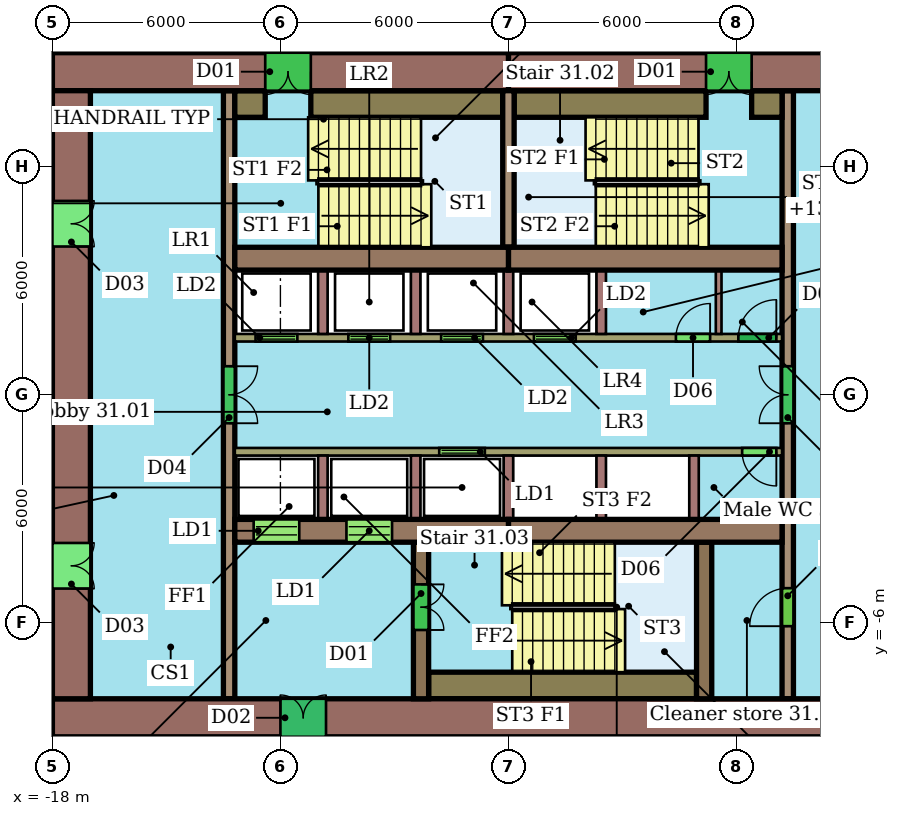
"""IFC4 building model, lengths in metres.
Left out: names, types, materials, properties, quantities, classifications, styles, units other than length and angle.
Written with IfcOpenShell. Run it as: python <this file> out.ifc"""

import sys

from ifc_helpers import new_model, si_unit, direction, frame, frame_2d, origin, place, context, subcontext, project, spatial, rectangle, extrude, element, fill, save


model = new_model("IFC4")
c1 = context("Model", 3, precision=1e-05, world=origin(), true_north=direction((0.0, 1.0)))
c2 = subcontext(c1, "Body", "Model", "MODEL_VIEW")
j1 = project(units=[si_unit("LENGTHUNIT", "METRE"), si_unit("PLANEANGLEUNIT", "RADIAN")], contexts=[c1])
p1 = place(None, origin())
s1 = spatial("IfcSite", under=j1, at=p1, CompositionType="ELEMENT")
p2 = place(p1, origin())
s2 = spatial("IfcBuilding", under=s1, at=p2, CompositionType="ELEMENT")
p3 = place(p2, frame((0.0, 0.0, 131.8)))
s3 = spatial("IfcBuildingStorey", under=s2, at=p3, CompositionType="ELEMENT", Elevation=131.8)
p4 = place(p3, frame((6.0, 8.5, 0.0), z_axis=(0.0, 0.0, 1.0), x_axis=(-1.0, 0.0, 0.0)))
e1 = element("IfcWall", 1, at=p4, inside=s3, PredefinedType="SHEAR", context=c2, shape_type="SweptSolid", body=[
    extrude(rectangle(XDim=12.0, YDim=1.0, at=frame_2d((6.0, 0.0))), origin(), (0.0, 0.0, 1.0), 3.3),
])
p5 = place(p4, frame((5.6, 0.0, 0.0)))
e2 = element("IfcOpeningElement", 2, at=p5, cuts=e1, PredefinedType="OPENING", context=c2, shape_type="SweptSolid", body=[
    extrude(rectangle(XDim=1.2, YDim=2.1, at=frame_2d((0.6, 1.05))), frame((0.0, 0.51, 0.0), z_axis=(0.0, -1.0, 0.0), x_axis=(1.0, 0.0, 0.0)), (0.0, 0.0, 1.0), 1.02),
])
p6 = place(p3, frame((-6.0, 8.5, 0.0), z_axis=(0.0, 0.0, 1.0), x_axis=(-1.0, 0.0, 0.0)))
e3 = element("IfcWall", 3, at=p6, inside=s3, PredefinedType="SHEAR", context=c2, shape_type="SweptSolid", body=[
    extrude(rectangle(XDim=12.0, YDim=1.0, at=frame_2d((6.0, 0.0))), origin(), (0.0, 0.0, 1.0), 3.3),
])
p7 = place(p6, frame((5.2, 0.0, 0.0)))
e4 = element("IfcOpeningElement", 4, at=p7, cuts=e3, PredefinedType="OPENING", context=c2, shape_type="SweptSolid", body=[
    extrude(rectangle(XDim=1.2, YDim=2.1, at=frame_2d((0.6, 1.05))), frame((0.0, 0.51, 0.0), z_axis=(0.0, -1.0, 0.0), x_axis=(1.0, 0.0, 0.0)), (0.0, 0.0, 1.0), 1.02),
])
p8 = place(p3, frame((-18.0, -8.5, 0.0), z_axis=(0.0, 0.0, 1.0), x_axis=(1.0, 0.0, 0.0)))
e5 = element("IfcWall", 5, at=p8, inside=s3, PredefinedType="SHEAR", context=c2, shape_type="SweptSolid", body=[
    extrude(rectangle(XDim=24.0, YDim=1.0, at=frame_2d((12.0, 0.0))), origin(), (0.0, 0.0, 1.0), 3.3),
])
p9 = place(p8, frame((6.0, 0.0, 0.0)))
e6 = element("IfcOpeningElement", 6, at=p9, cuts=e5, PredefinedType="OPENING", context=c2, shape_type="SweptSolid", body=[
    extrude(rectangle(XDim=1.2, YDim=2.1, at=frame_2d((0.6, 1.05))), frame((0.0, 0.51, 0.0), z_axis=(0.0, -1.0, 0.0), x_axis=(1.0, 0.0, 0.0)), (0.0, 0.0, 1.0), 1.02),
])
p10 = place(p3, frame((-17.5, 8.0, 0.0), z_axis=(0.0, 0.0, 1.0), x_axis=(0.0, -1.0, 0.0)))
e7 = element("IfcWall", 7, at=p10, inside=s3, PredefinedType="SHEAR", context=c2, shape_type="SweptSolid", body=[
    extrude(rectangle(XDim=16.0, YDim=1.0, at=frame_2d((8.0, 0.0))), origin(), (0.0, 0.0, 1.0), 3.3),
])
p11 = place(p10, frame((11.9, 0.0, 0.0)))
e8 = element("IfcOpeningElement", 8, at=p11, cuts=e7, PredefinedType="OPENING", context=c2, shape_type="SweptSolid", body=[
    extrude(rectangle(XDim=1.2, YDim=2.1, at=frame_2d((0.6, 1.05))), frame((0.0, 0.51, 0.0), z_axis=(0.0, -1.0, 0.0), x_axis=(1.0, 0.0, 0.0)), (0.0, 0.0, 1.0), 1.02),
])
p12 = place(p10, frame((2.9, 0.0, 0.0)))
e9 = element("IfcOpeningElement", 9, at=p12, cuts=e7, PredefinedType="OPENING", context=c2, shape_type="SweptSolid", body=[
    extrude(rectangle(XDim=1.2, YDim=2.1, at=frame_2d((0.6, 1.05))), frame((0.0, 0.51, 0.0), z_axis=(0.0, -1.0, 0.0), x_axis=(1.0, 0.0, 0.0)), (0.0, 0.0, 1.0), 1.02),
])
for number, where, z_axis, x_axis in (
    (10, (-13.2, 3.58, 0.0), (0.0, 0.0, 1.0), (1.0, 0.0, 0.0)),
    (11, (-6.0, 3.58, 0.0), (0.0, 0.0, 1.0), (1.0, 0.0, 0.0)),
):
    element("IfcWall", number, at=place(p3, frame(where, z_axis=z_axis, x_axis=x_axis)), inside=s3, PredefinedType="SHEAR", context=c2, shape_type="SweptSolid", body=[
        extrude(rectangle(XDim=7.2, YDim=0.6, at=frame_2d((3.6, 0.0))), origin(), (0.0, 0.0, 1.0), 3.3),
    ])
p13 = place(p3, frame((-13.2, -3.58, 0.0), z_axis=(0.0, 0.0, 1.0), x_axis=(1.0, 0.0, 0.0)))
e12 = element("IfcWall", 12, at=p13, inside=s3, PredefinedType="SHEAR", context=c2, shape_type="SweptSolid", body=[
    extrude(rectangle(XDim=7.2, YDim=0.6, at=frame_2d((3.6, 0.0))), origin(), (0.0, 0.0, 1.0), 3.3),
])
p14 = place(p13, frame((0.496, 0.0, 0.0)))
e13 = element("IfcOpeningElement", 13, at=p14, cuts=e12, PredefinedType="OPENING", context=c2, shape_type="SweptSolid", body=[
    extrude(rectangle(XDim=1.2, YDim=2.1, at=frame_2d((0.6, 1.05))), frame((0.0, 0.31, 0.0), z_axis=(0.0, -1.0, 0.0), x_axis=(1.0, 0.0, 0.0)), (0.0, 0.0, 1.0), 0.62),
])
p15 = place(p13, frame((2.938, 0.0, 0.0)))
e14 = element("IfcOpeningElement", 14, at=p15, cuts=e12, PredefinedType="OPENING", context=c2, shape_type="SweptSolid", body=[
    extrude(rectangle(XDim=1.2, YDim=2.1, at=frame_2d((0.6, 1.05))), frame((0.0, 0.31, 0.0), z_axis=(0.0, -1.0, 0.0), x_axis=(1.0, 0.0, 0.0)), (0.0, 0.0, 1.0), 0.62),
])
p16 = place(p3, frame((-6.0, -3.58, 0.0), z_axis=(0.0, 0.0, 1.0), x_axis=(1.0, 0.0, 0.0)))
e15 = element("IfcWall", 15, at=p16, inside=s3, PredefinedType="SHEAR", context=c2, shape_type="SweptSolid", body=[
    extrude(rectangle(XDim=7.2, YDim=0.6, at=frame_2d((3.6, 0.0))), origin(), (0.0, 0.0, 1.0), 3.3),
])
p17 = place(p3, frame((-13.35, 8.0, 0.0), z_axis=(0.0, 0.0, 1.0), x_axis=(0.0, -1.0, 0.0)))
e16 = element("IfcWall", 16, at=p17, inside=s3, PredefinedType="SHEAR", context=c2, shape_type="SweptSolid", body=[
    extrude(rectangle(XDim=16.0, YDim=0.3, at=frame_2d((8.0, 0.0))), origin(), (0.0, 0.0, 1.0), 3.3),
])
p18 = place(p17, frame((7.25, 0.0, 0.0)))
e17 = element("IfcOpeningElement", 17, at=p18, cuts=e16, PredefinedType="OPENING", context=c2, shape_type="SweptSolid", body=[
    extrude(rectangle(XDim=1.5, YDim=2.1, at=frame_2d((0.75, 1.05))), frame((0.0, 0.16, 0.0), z_axis=(0.0, -1.0, 0.0), x_axis=(1.0, 0.0, 0.0)), (0.0, 0.0, 1.0), 0.32),
])
p19 = place(p3, frame((1.35, -8.0, 0.0), z_axis=(0.0, 0.0, 1.0), x_axis=(0.0, 1.0, 0.0)))
e18 = element("IfcWall", 18, at=p19, inside=s3, PredefinedType="SHEAR", context=c2, shape_type="SweptSolid", body=[
    extrude(rectangle(XDim=16.0, YDim=0.3, at=frame_2d((8.0, 0.0))), origin(), (0.0, 0.0, 1.0), 3.3),
])
p20 = place(p19, frame((1.91, 0.0, 0.0)))
e19 = element("IfcOpeningElement", 19, at=p20, cuts=e18, PredefinedType="OPENING", context=c2, shape_type="SweptSolid", body=[
    extrude(rectangle(XDim=1.0, YDim=2.1, at=frame_2d((0.5, 1.05))), frame((0.0, 0.16, 0.0), z_axis=(0.0, -1.0, 0.0), x_axis=(1.0, 0.0, 0.0)), (0.0, 0.0, 1.0), 0.32),
])
p21 = place(p19, frame((7.25, 0.0, 0.0)))
e20 = element("IfcOpeningElement", 20, at=p21, cuts=e18, PredefinedType="OPENING", context=c2, shape_type="SweptSolid", body=[
    extrude(rectangle(XDim=1.5, YDim=2.1, at=frame_2d((0.75, 1.05))), frame((0.0, 0.16, 0.0), z_axis=(0.0, -1.0, 0.0), x_axis=(1.0, 0.0, 0.0)), (0.0, 0.0, 1.0), 0.32),
])
p22 = place(p3, frame((-13.2, 1.5, 0.0), z_axis=(0.0, 0.0, 1.0), x_axis=(1.0, 0.0, 0.0)))
e21 = element("IfcWall", 21, at=p22, inside=s3, PredefinedType="SHEAR", context=c2, shape_type="SweptSolid", body=[
    extrude(rectangle(XDim=14.4, YDim=0.2, at=frame_2d((7.2, 0.0))), origin(), (0.0, 0.0, 1.0), 3.3),
])
p23 = place(p22, frame((0.546, 0.0, 0.0)))
e22 = element("IfcOpeningElement", 22, at=p23, cuts=e21, PredefinedType="OPENING", context=c2, shape_type="SweptSolid", body=[
    extrude(rectangle(XDim=1.1, YDim=2.1, at=frame_2d((0.55, 1.05))), frame((0.0, 0.11, 0.0), z_axis=(0.0, -1.0, 0.0), x_axis=(1.0, 0.0, 0.0)), (0.0, 0.0, 1.0), 0.22),
])
p24 = place(p22, frame((2.988, 0.0, 0.0)))
e23 = element("IfcOpeningElement", 23, at=p24, cuts=e21, PredefinedType="OPENING", context=c2, shape_type="SweptSolid", body=[
    extrude(rectangle(XDim=1.1, YDim=2.1, at=frame_2d((0.55, 1.05))), frame((0.0, 0.11, 0.0), z_axis=(0.0, -1.0, 0.0), x_axis=(1.0, 0.0, 0.0)), (0.0, 0.0, 1.0), 0.22),
])
p25 = place(p22, frame((5.429, 0.0, 0.0)))
e24 = element("IfcOpeningElement", 24, at=p25, cuts=e21, PredefinedType="OPENING", context=c2, shape_type="SweptSolid", body=[
    extrude(rectangle(XDim=1.1, YDim=2.1, at=frame_2d((0.55, 1.05))), frame((0.0, 0.11, 0.0), z_axis=(0.0, -1.0, 0.0), x_axis=(1.0, 0.0, 0.0)), (0.0, 0.0, 1.0), 0.22),
])
p26 = place(p22, frame((7.871, 0.0, 0.0)))
e25 = element("IfcOpeningElement", 25, at=p26, cuts=e21, PredefinedType="OPENING", context=c2, shape_type="SweptSolid", body=[
    extrude(rectangle(XDim=1.1, YDim=2.1, at=frame_2d((0.55, 1.05))), frame((0.0, 0.11, 0.0), z_axis=(0.0, -1.0, 0.0), x_axis=(1.0, 0.0, 0.0)), (0.0, 0.0, 1.0), 0.22),
])
p27 = place(p22, frame((11.607, 0.0, 0.0)))
e26 = element("IfcOpeningElement", 26, at=p27, cuts=e21, PredefinedType="OPENING", context=c2, shape_type="SweptSolid", body=[
    extrude(rectangle(XDim=0.9, YDim=2.1, at=frame_2d((0.45, 1.05))), frame((0.0, 0.11, 0.0), z_axis=(0.0, -1.0, 0.0), x_axis=(1.0, 0.0, 0.0)), (0.0, 0.0, 1.0), 0.22),
])
p28 = place(p22, frame((13.25, 0.0, 0.0)))
e27 = element("IfcOpeningElement", 27, at=p28, cuts=e21, PredefinedType="OPENING", context=c2, shape_type="SweptSolid", body=[
    extrude(rectangle(XDim=1.0, YDim=2.1, at=frame_2d((0.5, 1.05))), frame((0.0, 0.11, 0.0), z_axis=(0.0, -1.0, 0.0), x_axis=(1.0, 0.0, 0.0)), (0.0, 0.0, 1.0), 0.22),
])
p29 = place(p3, frame((1.2, -1.5, 0.0), z_axis=(0.0, 0.0, 1.0), x_axis=(-1.0, 0.0, 0.0)))
e28 = element("IfcWall", 28, at=p29, inside=s3, PredefinedType="SHEAR", context=c2, shape_type="SweptSolid", body=[
    extrude(rectangle(XDim=14.4, YDim=0.2, at=frame_2d((7.2, 0.0))), origin(), (0.0, 0.0, 1.0), 3.3),
])
p30 = place(p29, frame((7.821, 0.0, 0.0)))
e29 = element("IfcOpeningElement", 29, at=p30, cuts=e28, PredefinedType="OPENING", context=c2, shape_type="SweptSolid", body=[
    extrude(rectangle(XDim=1.2, YDim=2.1, at=frame_2d((0.6, 1.05))), frame((0.0, 0.11, 0.0), z_axis=(0.0, -1.0, 0.0), x_axis=(1.0, 0.0, 0.0)), (0.0, 0.0, 1.0), 0.22),
])
p31 = place(p29, frame((0.15, 0.0, 0.0)))
e30 = element("IfcOpeningElement", 30, at=p31, cuts=e28, PredefinedType="OPENING", context=c2, shape_type="SweptSolid", body=[
    extrude(rectangle(XDim=0.9, YDim=2.1, at=frame_2d((0.45, 1.05))), frame((0.0, 0.11, 0.0), z_axis=(0.0, -1.0, 0.0), x_axis=(1.0, 0.0, 0.0)), (0.0, 0.0, 1.0), 0.22),
])
p32 = place(p3, frame((-8.3, -3.88, 0.0), z_axis=(0.0, 0.0, 1.0), x_axis=(0.0, -1.0, 0.0)))
e31 = element("IfcWall", 31, at=p32, inside=s3, PredefinedType="SHEAR", context=c2, shape_type="SweptSolid", body=[
    extrude(rectangle(XDim=4.12, YDim=0.4, at=frame_2d((2.06, 0.0))), origin(), (0.0, 0.0, 1.0), 3.3),
])
p33 = place(p32, frame((1.11, 0.0, 0.0)))
e32 = element("IfcOpeningElement", 32, at=p33, cuts=e31, PredefinedType="OPENING", context=c2, shape_type="SweptSolid", body=[
    extrude(rectangle(XDim=1.2, YDim=2.1, at=frame_2d((0.6, 1.05))), frame((0.0, 0.21, 0.0), z_axis=(0.0, -1.0, 0.0), x_axis=(1.0, 0.0, 0.0)), (0.0, 0.0, 1.0), 0.42),
])
p34 = place(p3, frame((-0.85, -3.88, 0.0), z_axis=(0.0, 0.0, 1.0), x_axis=(0.0, -1.0, 0.0)))
e33 = element("IfcWall", 33, at=p34, inside=s3, PredefinedType="SHEAR", context=c2, shape_type="SweptSolid", body=[
    extrude(rectangle(XDim=4.12, YDim=0.4, at=frame_2d((2.06, 0.0))), origin(), (0.0, 0.0, 1.0), 3.3),
])
p35 = place(p3, frame((-6.0, 3.88, 0.0), z_axis=(0.0, 0.0, 1.0), x_axis=(0.0, 1.0, 0.0)))
e34 = element("IfcWall", 34, at=p35, inside=s3, PredefinedType="SHEAR", context=c2, shape_type="SweptSolid", body=[
    extrude(rectangle(XDim=4.12, YDim=0.3, at=frame_2d((2.06, 0.0))), origin(), (0.0, 0.0, 1.0), 3.3),
])
p36 = place(p3, frame((-13.2, 7.65, 0.0), z_axis=(0.0, 0.0, 1.0), x_axis=(1.0, 0.0, 0.0)))
e35 = element("IfcWall", 35, at=p36, inside=s3, PredefinedType="SHEAR", context=c2, shape_type="SweptSolid", body=[
    extrude(rectangle(XDim=0.8, YDim=0.7, at=frame_2d((0.4, 0.0))), origin(), (0.0, 0.0, 1.0), 3.3),
])
for number, where, z_axis, x_axis in (
    (36, (-11.2, 7.65, 0.0), (0.0, 0.0, 1.0), (1.0, 0.0, 0.0)),
    (37, (-5.85, 7.65, 0.0), (0.0, 0.0, 1.0), (1.0, 0.0, 0.0)),
):
    element("IfcWall", number, at=place(p3, frame(where, z_axis=z_axis, x_axis=x_axis)), inside=s3, PredefinedType="SHEAR", context=c2, shape_type="SweptSolid", body=[
        extrude(rectangle(XDim=5.05, YDim=0.7, at=frame_2d((2.525, 0.0))), origin(), (0.0, 0.0, 1.0), 3.3),
    ])
p37 = place(p3, frame((0.4, 7.65, 0.0), z_axis=(0.0, 0.0, 1.0), x_axis=(1.0, 0.0, 0.0)))
e38 = element("IfcWall", 38, at=p37, inside=s3, PredefinedType="SHEAR", context=c2, shape_type="SweptSolid", body=[
    extrude(rectangle(XDim=0.8, YDim=0.7, at=frame_2d((0.4, 0.0))), origin(), (0.0, 0.0, 1.0), 3.3),
])
p38 = place(p3, frame((-8.1, -7.65, 0.0), z_axis=(0.0, 0.0, 1.0), x_axis=(1.0, 0.0, 0.0)))
e39 = element("IfcWall", 39, at=p38, inside=s3, PredefinedType="SHEAR", context=c2, shape_type="SweptSolid", body=[
    extrude(rectangle(XDim=7.05, YDim=0.7, at=frame_2d((3.525, 0.0))), origin(), (0.0, 0.0, 1.0), 3.3),
])
for number, where, z_axis, x_axis in (
    (40, (-10.883, 1.6, 0.0), (0.0, 0.0, 1.0), (0.0, 1.0, 0.0)),
    (41, (-8.442, 1.6, 0.0), (0.0, 0.0, 1.0), (0.0, 1.0, 0.0)),
    (42, (-6.0, 1.6, 0.0), (0.0, 0.0, 1.0), (0.0, 1.0, 0.0)),
    (43, (-3.558, 1.6, 0.0), (0.0, 0.0, 1.0), (0.0, 1.0, 0.0)),
):
    element("IfcWall", number, at=place(p3, frame(where, z_axis=z_axis, x_axis=x_axis)), inside=s3, PredefinedType="SHEAR", context=c2, shape_type="SweptSolid", body=[
        extrude(rectangle(XDim=1.68, YDim=0.25, at=frame_2d((0.84, 0.0))), origin(), (0.0, 0.0, 1.0), 3.3),
    ])
p39 = place(p3, frame((-0.468, 1.6, 0.0), z_axis=(0.0, 0.0, 1.0), x_axis=(0.0, 1.0, 0.0)))
e44 = element("IfcWall", 44, at=p39, inside=s3, PredefinedType="PARTITIONING", context=c2, shape_type="SweptSolid", body=[
    extrude(rectangle(XDim=1.68, YDim=0.15, at=frame_2d((0.84, 0.0))), origin(), (0.0, 0.0, 1.0), 3.3),
])
for number, where, z_axis, x_axis in (
    (45, (-10.883, -1.6, 0.0), (0.0, 0.0, 1.0), (0.0, -1.0, 0.0)),
    (46, (-8.442, -1.6, 0.0), (0.0, 0.0, 1.0), (0.0, -1.0, 0.0)),
    (47, (-6.0, -1.6, 0.0), (0.0, 0.0, 1.0), (0.0, -1.0, 0.0)),
    (48, (-3.558, -1.6, 0.0), (0.0, 0.0, 1.0), (0.0, -1.0, 0.0)),
    (49, (-1.117, -1.6, 0.0), (0.0, 0.0, 1.0), (0.0, -1.0, 0.0)),
):
    element("IfcWall", number, at=place(p3, frame(where, z_axis=z_axis, x_axis=x_axis)), inside=s3, PredefinedType="SHEAR", context=c2, shape_type="SweptSolid", body=[
        extrude(rectangle(XDim=1.68, YDim=0.25, at=frame_2d((0.84, 0.0))), origin(), (0.0, 0.0, 1.0), 3.3),
    ])
p40 = place(p5, origin())
e50 = element("IfcDoor", 50, at=p40, inside=s3, OperationType="DOUBLE_DOOR_SINGLE_SWING", PredefinedType="NOTDEFINED", context=c2, shape_type="SweptSolid", body=[
    extrude(rectangle(XDim=1.2, YDim=2.1, at=frame_2d((0.6, 1.05))), frame((0.0, 0.025, 0.0), z_axis=(0.0, -1.0, 0.0), x_axis=(1.0, 0.0, 0.0)), (0.0, 0.0, 1.0), 0.05),
])
fill(e2, e50)
p41 = place(p7, origin())
e51 = element("IfcDoor", 51, at=p41, inside=s3, OperationType="DOUBLE_DOOR_SINGLE_SWING", PredefinedType="NOTDEFINED", context=c2, shape_type="SweptSolid", body=[
    extrude(rectangle(XDim=1.2, YDim=2.1, at=frame_2d((0.6, 1.05))), frame((0.0, 0.025, 0.0), z_axis=(0.0, -1.0, 0.0), x_axis=(1.0, 0.0, 0.0)), (0.0, 0.0, 1.0), 0.05),
])
fill(e4, e51)
p42 = place(p9, origin())
e52 = element("IfcDoor", 52, at=p42, inside=s3, OperationType="DOUBLE_DOOR_SINGLE_SWING", PredefinedType="NOTDEFINED", context=c2, shape_type="SweptSolid", body=[
    extrude(rectangle(XDim=1.2, YDim=2.1, at=frame_2d((0.6, 1.05))), frame((0.0, 0.025, 0.0), z_axis=(0.0, -1.0, 0.0), x_axis=(1.0, 0.0, 0.0)), (0.0, 0.0, 1.0), 0.05),
])
fill(e6, e52)
p43 = place(p11, origin())
e53 = element("IfcDoor", 53, at=p43, inside=s3, OperationType="DOUBLE_DOOR_SINGLE_SWING", PredefinedType="NOTDEFINED", context=c2, shape_type="SweptSolid", body=[
    extrude(rectangle(XDim=1.2, YDim=2.1, at=frame_2d((0.6, 1.05))), frame((0.0, 0.025, 0.0), z_axis=(0.0, -1.0, 0.0), x_axis=(1.0, 0.0, 0.0)), (0.0, 0.0, 1.0), 0.05),
])
fill(e8, e53)
p44 = place(p12, origin())
e54 = element("IfcDoor", 54, at=p44, inside=s3, OperationType="DOUBLE_DOOR_SINGLE_SWING", PredefinedType="NOTDEFINED", context=c2, shape_type="SweptSolid", body=[
    extrude(rectangle(XDim=1.2, YDim=2.1, at=frame_2d((0.6, 1.05))), frame((0.0, 0.025, 0.0), z_axis=(0.0, -1.0, 0.0), x_axis=(1.0, 0.0, 0.0)), (0.0, 0.0, 1.0), 0.05),
])
fill(e9, e54)
p45 = place(p14, origin())
e55 = element("IfcDoor", 55, at=p45, inside=s3, OperationType="DOUBLE_DOOR_SLIDING", PredefinedType="NOTDEFINED", context=c2, shape_type="SweptSolid", body=[
    extrude(rectangle(XDim=1.2, YDim=2.1, at=frame_2d((0.6, 1.05))), frame((0.0, 0.025, 0.0), z_axis=(0.0, -1.0, 0.0), x_axis=(1.0, 0.0, 0.0)), (0.0, 0.0, 1.0), 0.05),
])
fill(e13, e55)
p46 = place(p15, origin())
e56 = element("IfcDoor", 56, at=p46, inside=s3, OperationType="DOUBLE_DOOR_SLIDING", PredefinedType="NOTDEFINED", context=c2, shape_type="SweptSolid", body=[
    extrude(rectangle(XDim=1.2, YDim=2.1, at=frame_2d((0.6, 1.05))), frame((0.0, 0.025, 0.0), z_axis=(0.0, -1.0, 0.0), x_axis=(1.0, 0.0, 0.0)), (0.0, 0.0, 1.0), 0.05),
])
fill(e14, e56)
p47 = place(p18, origin())
e57 = element("IfcDoor", 57, at=p47, inside=s3, OperationType="DOUBLE_DOOR_SINGLE_SWING", PredefinedType="NOTDEFINED", context=c2, shape_type="SweptSolid", body=[
    extrude(rectangle(XDim=1.5, YDim=2.1, at=frame_2d((0.75, 1.05))), frame((0.0, 0.025, 0.0), z_axis=(0.0, -1.0, 0.0), x_axis=(1.0, 0.0, 0.0)), (0.0, 0.0, 1.0), 0.05),
])
fill(e17, e57)
p48 = place(p20, origin())
e58 = element("IfcDoor", 58, at=p48, inside=s3, OperationType="SINGLE_SWING_LEFT", PredefinedType="NOTDEFINED", context=c2, shape_type="SweptSolid", body=[
    extrude(rectangle(XDim=1.0, YDim=2.1, at=frame_2d((0.5, 1.05))), frame((0.0, 0.025, 0.0), z_axis=(0.0, -1.0, 0.0), x_axis=(1.0, 0.0, 0.0)), (0.0, 0.0, 1.0), 0.05),
])
fill(e19, e58)
p49 = place(p21, origin())
e59 = element("IfcDoor", 59, at=p49, inside=s3, OperationType="DOUBLE_DOOR_SINGLE_SWING", PredefinedType="NOTDEFINED", context=c2, shape_type="SweptSolid", body=[
    extrude(rectangle(XDim=1.5, YDim=2.1, at=frame_2d((0.75, 1.05))), frame((0.0, 0.025, 0.0), z_axis=(0.0, -1.0, 0.0), x_axis=(1.0, 0.0, 0.0)), (0.0, 0.0, 1.0), 0.05),
])
fill(e20, e59)
p50 = place(p23, origin())
e60 = element("IfcDoor", 60, at=p50, inside=s3, OperationType="DOUBLE_DOOR_SLIDING", PredefinedType="NOTDEFINED", context=c2, shape_type="SweptSolid", body=[
    extrude(rectangle(XDim=1.1, YDim=2.1, at=frame_2d((0.55, 1.05))), frame((0.0, 0.025, 0.0), z_axis=(0.0, -1.0, 0.0), x_axis=(1.0, 0.0, 0.0)), (0.0, 0.0, 1.0), 0.05),
])
fill(e22, e60)
p51 = place(p24, origin())
e61 = element("IfcDoor", 61, at=p51, inside=s3, OperationType="DOUBLE_DOOR_SLIDING", PredefinedType="NOTDEFINED", context=c2, shape_type="SweptSolid", body=[
    extrude(rectangle(XDim=1.1, YDim=2.1, at=frame_2d((0.55, 1.05))), frame((0.0, 0.025, 0.0), z_axis=(0.0, -1.0, 0.0), x_axis=(1.0, 0.0, 0.0)), (0.0, 0.0, 1.0), 0.05),
])
fill(e23, e61)
p52 = place(p25, origin())
e62 = element("IfcDoor", 62, at=p52, inside=s3, OperationType="DOUBLE_DOOR_SLIDING", PredefinedType="NOTDEFINED", context=c2, shape_type="SweptSolid", body=[
    extrude(rectangle(XDim=1.1, YDim=2.1, at=frame_2d((0.55, 1.05))), frame((0.0, 0.025, 0.0), z_axis=(0.0, -1.0, 0.0), x_axis=(1.0, 0.0, 0.0)), (0.0, 0.0, 1.0), 0.05),
])
fill(e24, e62)
p53 = place(p26, origin())
e63 = element("IfcDoor", 63, at=p53, inside=s3, OperationType="DOUBLE_DOOR_SLIDING", PredefinedType="NOTDEFINED", context=c2, shape_type="SweptSolid", body=[
    extrude(rectangle(XDim=1.1, YDim=2.1, at=frame_2d((0.55, 1.05))), frame((0.0, 0.025, 0.0), z_axis=(0.0, -1.0, 0.0), x_axis=(1.0, 0.0, 0.0)), (0.0, 0.0, 1.0), 0.05),
])
fill(e25, e63)
p54 = place(p27, origin())
e64 = element("IfcDoor", 64, at=p54, inside=s3, OperationType="SINGLE_SWING_RIGHT", PredefinedType="NOTDEFINED", context=c2, shape_type="SweptSolid", body=[
    extrude(rectangle(XDim=0.9, YDim=2.1, at=frame_2d((0.45, 1.05))), frame((0.0, 0.025, 0.0), z_axis=(0.0, -1.0, 0.0), x_axis=(1.0, 0.0, 0.0)), (0.0, 0.0, 1.0), 0.05),
])
fill(e26, e64)
p55 = place(p28, origin())
e65 = element("IfcDoor", 65, at=p55, inside=s3, OperationType="SINGLE_SWING_RIGHT", PredefinedType="NOTDEFINED", context=c2, shape_type="SweptSolid", body=[
    extrude(rectangle(XDim=1.0, YDim=2.1, at=frame_2d((0.5, 1.05))), frame((0.0, 0.025, 0.0), z_axis=(0.0, -1.0, 0.0), x_axis=(1.0, 0.0, 0.0)), (0.0, 0.0, 1.0), 0.05),
])
fill(e27, e65)
p56 = place(p30, origin())
e66 = element("IfcDoor", 66, at=p56, inside=s3, OperationType="DOUBLE_DOOR_SLIDING", PredefinedType="NOTDEFINED", context=c2, shape_type="SweptSolid", body=[
    extrude(rectangle(XDim=1.2, YDim=2.1, at=frame_2d((0.6, 1.05))), frame((0.0, 0.025, 0.0), z_axis=(0.0, -1.0, 0.0), x_axis=(1.0, 0.0, 0.0)), (0.0, 0.0, 1.0), 0.05),
])
fill(e29, e66)
p57 = place(p31, origin())
e67 = element("IfcDoor", 67, at=p57, inside=s3, OperationType="SINGLE_SWING_LEFT", PredefinedType="NOTDEFINED", context=c2, shape_type="SweptSolid", body=[
    extrude(rectangle(XDim=0.9, YDim=2.1, at=frame_2d((0.45, 1.05))), frame((0.0, 0.025, 0.0), z_axis=(0.0, -1.0, 0.0), x_axis=(1.0, 0.0, 0.0)), (0.0, 0.0, 1.0), 0.05),
])
fill(e30, e67)
p58 = place(p33, origin())
e68 = element("IfcDoor", 68, at=p58, inside=s3, OperationType="DOUBLE_DOOR_SINGLE_SWING", PredefinedType="NOTDEFINED", context=c2, shape_type="SweptSolid", body=[
    extrude(rectangle(XDim=1.2, YDim=2.1, at=frame_2d((0.6, 1.05))), frame((0.0, 0.025, 0.0), z_axis=(0.0, -1.0, 0.0), x_axis=(1.0, 0.0, 0.0)), (0.0, 0.0, 1.0), 0.05),
])
fill(e32, e68)
save(model, sys.argv[1])
